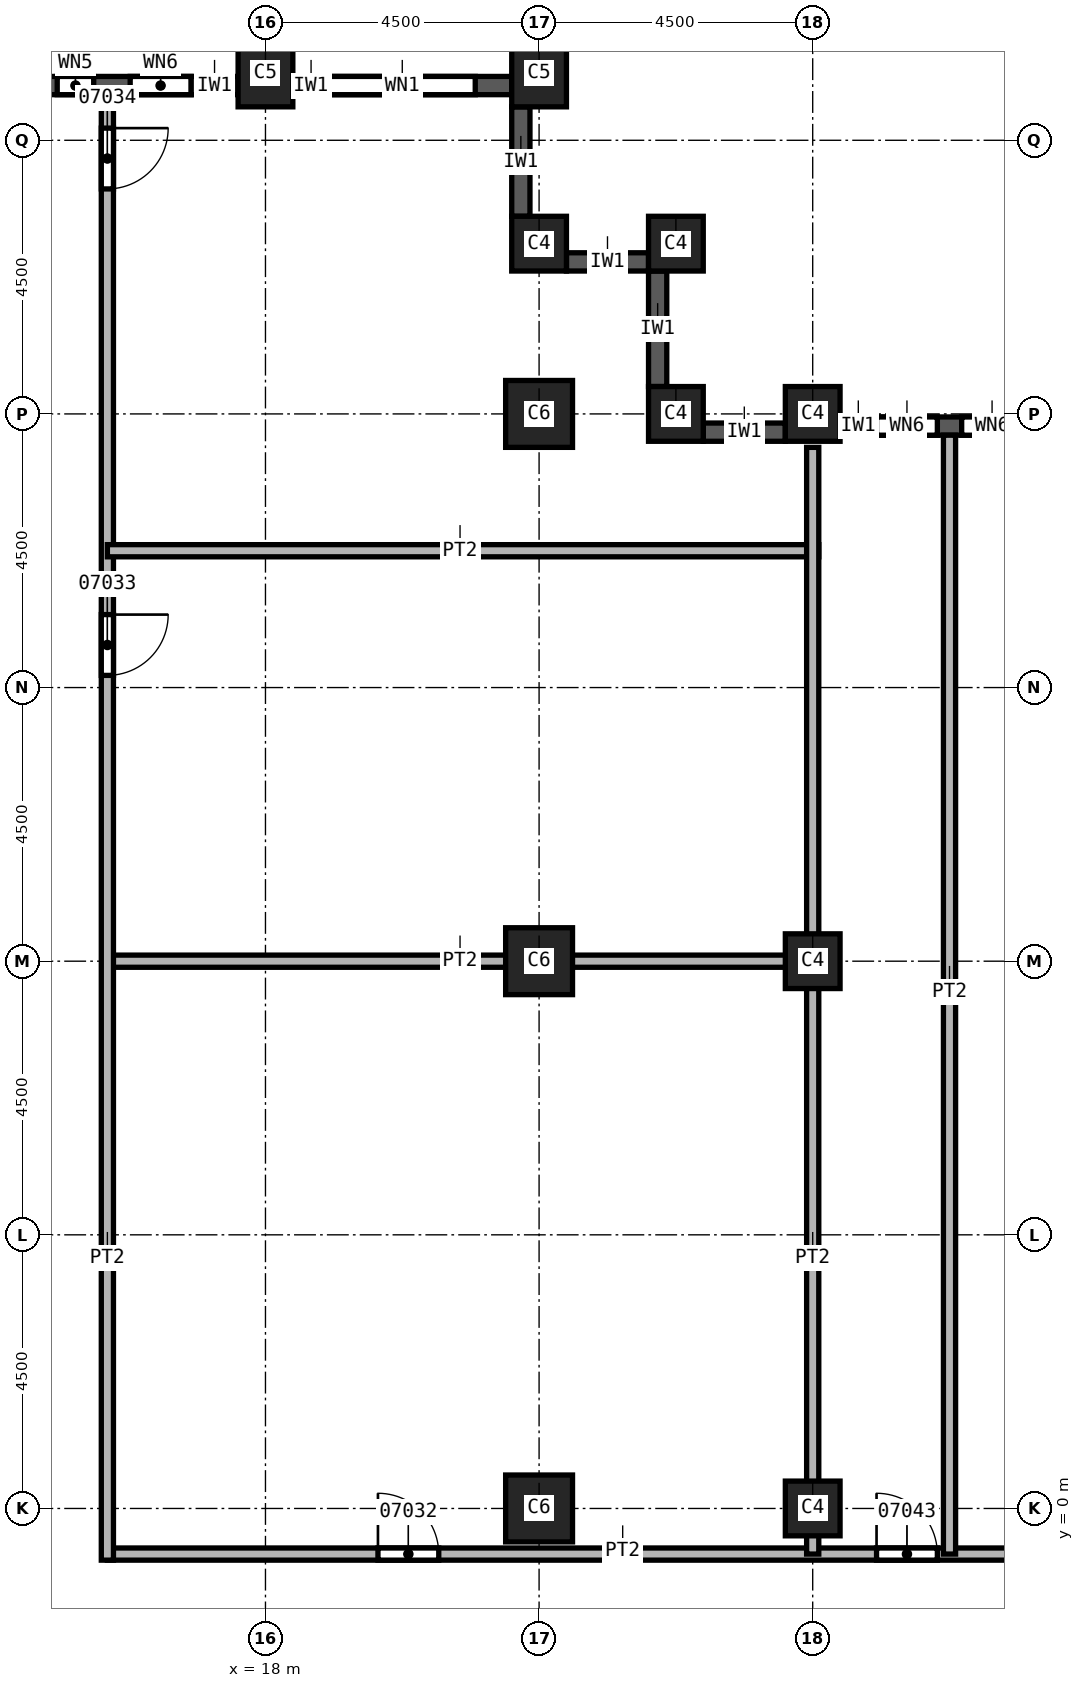
"""IFC4 building model, lengths in metres.
Left out: names, types, materials, properties, quantities, classifications, styles, units other than length and angle.
Written with IfcOpenShell. Run it as: python <this file> out.ifc"""

import sys

from ifc_helpers import new_model, si_unit, direction, frame, frame_2d, origin, origin_2d, place, context, subcontext, project, spatial, rectangle, extrude, element, fill, save


model = new_model("IFC4")
c1 = context("Model", 3, precision=1e-05, world=origin(), true_north=direction((0.0, 1.0)))
c2 = subcontext(c1, "Body", "Model", "MODEL_VIEW")
j1 = project(units=[si_unit("LENGTHUNIT", "METRE"), si_unit("PLANEANGLEUNIT", "RADIAN")], contexts=[c1])
p1 = place(None, origin())
s1 = spatial("IfcSite", under=j1, at=p1, CompositionType="ELEMENT")
p2 = place(p1, origin())
s2 = spatial("IfcBuilding", under=s1, at=p2, CompositionType="ELEMENT")
p3 = place(p2, frame((0.0, 0.0, 138.0)))
s3 = spatial("IfcBuildingStorey", under=s2, at=p3, CompositionType="ELEMENT", Elevation=138.0)
for number, where, z_axis, x_axis in (
    (1, (22.5, 0.0, 0.0), (0.0, 0.0, 1.0), (1.0, 0.0, 0.0)),
    (2, (22.5, 9.0, 0.0), (0.0, 0.0, 1.0), (1.0, 0.0, 0.0)),
    (3, (22.5, 18.0, 0.0), (0.0, 0.0, 1.0), (1.0, 0.0, 0.0)),
):
    element("IfcColumn", number, at=place(p3, frame(where, z_axis=z_axis, x_axis=x_axis)), inside=s3, PredefinedType="COLUMN", context=c2, shape_type="SweptSolid", body=[
        extrude(rectangle(XDim=1.1, YDim=1.1, at=origin_2d()), origin(), (0.0, 0.0, 1.0), 3.7),
    ])
for number, where, z_axis, x_axis in (
    (4, (27.0, 0.0, 0.0), (0.0, 0.0, 1.0), (1.0, 0.0, 0.0)),
    (5, (27.0, 9.0, 0.0), (0.0, 0.0, 1.0), (1.0, 0.0, 0.0)),
    (6, (27.0, 18.0, 0.0), (0.0, 0.0, 1.0), (1.0, 0.0, 0.0)),
):
    element("IfcColumn", number, at=place(p3, frame(where, z_axis=z_axis, x_axis=x_axis)), inside=s3, PredefinedType="COLUMN", context=c2, shape_type="SweptSolid", body=[
        extrude(rectangle(XDim=0.9, YDim=0.9, at=origin_2d()), origin(), (0.0, 0.0, 1.0), 3.7),
    ])
for number, where, z_axis, x_axis in (
    (7, (18.0, 23.6, 0.0), (0.0, 0.0, 1.0), (1.0, 0.0, 0.0)),
    (8, (22.5, 23.6, 0.0), (0.0, 0.0, 1.0), (1.0, 0.0, 0.0)),
):
    element("IfcColumn", number, at=place(p3, frame(where, z_axis=z_axis, x_axis=x_axis)), inside=s3, PredefinedType="COLUMN", context=c2, shape_type="SweptSolid", body=[
        extrude(rectangle(XDim=0.9, YDim=1.1, at=origin_2d()), origin(), (0.0, 0.0, 1.0), 3.7),
    ])
for number, where, z_axis, x_axis in (
    (9, (22.5, 20.8, 0.0), (0.0, 0.0, 1.0), (1.0, 0.0, 0.0)),
    (10, (24.75, 20.8, 0.0), (0.0, 0.0, 1.0), (1.0, 0.0, 0.0)),
    (11, (24.75, 18.0, 0.0), (0.0, 0.0, 1.0), (1.0, 0.0, 0.0)),
):
    element("IfcColumn", number, at=place(p3, frame(where, z_axis=z_axis, x_axis=x_axis)), inside=s3, PredefinedType="COLUMN", context=c2, shape_type="SweptSolid", body=[
        extrude(rectangle(XDim=0.9, YDim=0.9, at=origin_2d()), origin(), (0.0, 0.0, 1.0), 3.7),
    ])
p4 = place(p3, frame((31.05, 17.8, 0.0), z_axis=(0.0, 0.0, 1.0), x_axis=(-1.0, 0.0, 0.0)))
e12 = element("IfcWall", 12, at=p4, inside=s3, PredefinedType="SOLIDWALL", context=c2, shape_type="SweptSolid", body=[
    extrude(rectangle(XDim=3.6, YDim=0.3, at=frame_2d((1.8, 0.0))), origin(), (0.0, 0.0, 1.0), 3.1),
])
p5 = place(p4, frame((0.6, 0.0, 0.8)))
e13 = element("IfcOpeningElement", 13, at=p5, cuts=e12, PredefinedType="OPENING", context=c2, shape_type="SweptSolid", body=[
    extrude(rectangle(XDim=1.0, YDim=1.95, at=frame_2d((0.5, 0.975))), frame((0.0, 0.15, 0.0), z_axis=(0.0, -1.0, 0.0), x_axis=(1.0, 0.0, 0.0)), (0.0, 0.0, 1.0), 0.3),
])
p6 = place(p4, frame((2.0, 0.0, 0.8)))
e14 = element("IfcOpeningElement", 14, at=p6, cuts=e12, PredefinedType="OPENING", context=c2, shape_type="SweptSolid", body=[
    extrude(rectangle(XDim=1.0, YDim=1.95, at=frame_2d((0.5, 0.975))), frame((0.0, 0.15, 0.0), z_axis=(0.0, -1.0, 0.0), x_axis=(1.0, 0.0, 0.0)), (0.0, 0.0, 1.0), 0.3),
])
p7 = place(p3, frame((26.55, 17.7, 0.0), z_axis=(0.0, 0.0, 1.0), x_axis=(-1.0, 0.0, 0.0)))
e15 = element("IfcWall", 15, at=p7, inside=s3, PredefinedType="SOLIDWALL", context=c2, shape_type="SweptSolid", body=[
    extrude(rectangle(XDim=1.35, YDim=0.3, at=frame_2d((0.675, 0.0))), origin(), (0.0, 0.0, 1.0), 3.1),
])
p8 = place(p3, frame((24.45, 18.45, 0.0), z_axis=(0.0, 0.0, 1.0), x_axis=(0.0, 1.0, 0.0)))
e16 = element("IfcWall", 16, at=p8, inside=s3, PredefinedType="SOLIDWALL", context=c2, shape_type="SweptSolid", body=[
    extrude(rectangle(XDim=1.9, YDim=0.3, at=frame_2d((0.95, 0.0))), origin(), (0.0, 0.0, 1.0), 3.1),
])
p9 = place(p3, frame((24.3, 20.5, 0.0), z_axis=(0.0, 0.0, 1.0), x_axis=(-1.0, 0.0, 0.0)))
e17 = element("IfcWall", 17, at=p9, inside=s3, PredefinedType="SOLIDWALL", context=c2, shape_type="SweptSolid", body=[
    extrude(rectangle(XDim=1.35, YDim=0.3, at=frame_2d((0.675, 0.0))), origin(), (0.0, 0.0, 1.0), 3.1),
])
p10 = place(p3, frame((22.2, 21.25, 0.0), z_axis=(0.0, 0.0, 1.0), x_axis=(0.0, 1.0, 0.0)))
e18 = element("IfcWall", 18, at=p10, inside=s3, PredefinedType="SOLIDWALL", context=c2, shape_type="SweptSolid", body=[
    extrude(rectangle(XDim=1.8, YDim=0.3, at=frame_2d((0.9, 0.0))), origin(), (0.0, 0.0, 1.0), 3.1),
])
p11 = place(p3, frame((22.05, 23.4, 0.0), z_axis=(0.0, 0.0, 1.0), x_axis=(-1.0, 0.0, 0.0)))
e19 = element("IfcWall", 19, at=p11, inside=s3, PredefinedType="SOLIDWALL", context=c2, shape_type="SweptSolid", body=[
    extrude(rectangle(XDim=3.6, YDim=0.3, at=frame_2d((1.8, 0.0))), origin(), (0.0, 0.0, 1.0), 3.1),
])
p12 = place(p11, frame((0.6, 0.0, 0.8)))
e20 = element("IfcOpeningElement", 20, at=p12, cuts=e19, PredefinedType="OPENING", context=c2, shape_type="SweptSolid", body=[
    extrude(rectangle(XDim=2.4, YDim=1.95, at=frame_2d((1.2, 0.975))), frame((0.0, 0.15, 0.0), z_axis=(0.0, -1.0, 0.0), x_axis=(1.0, 0.0, 0.0)), (0.0, 0.0, 1.0), 0.3),
])
p13 = place(p3, frame((17.55, 23.4, 0.0), z_axis=(0.0, 0.0, 1.0), x_axis=(-1.0, 0.0, 0.0)))
e21 = element("IfcWall", 21, at=p13, inside=s3, PredefinedType="SOLIDWALL", context=c2, shape_type="SweptSolid", body=[
    extrude(rectangle(XDim=3.6, YDim=0.3, at=frame_2d((1.8, 0.0))), origin(), (0.0, 0.0, 1.0), 3.1),
])
p14 = place(p13, frame((0.775, 0.0, 0.8)))
e22 = element("IfcOpeningElement", 22, at=p14, cuts=e21, PredefinedType="OPENING", context=c2, shape_type="SweptSolid", body=[
    extrude(rectangle(XDim=1.0, YDim=1.95, at=frame_2d((0.5, 0.975))), frame((0.0, 0.15, 0.0), z_axis=(0.0, -1.0, 0.0), x_axis=(1.0, 0.0, 0.0)), (0.0, 0.0, 1.0), 0.3),
])
p15 = place(p13, frame((2.375, 0.0, 0.8)))
e23 = element("IfcOpeningElement", 23, at=p15, cuts=e21, PredefinedType="OPENING", context=c2, shape_type="SweptSolid", body=[
    extrude(rectangle(XDim=0.6, YDim=1.95, at=frame_2d((0.3, 0.975))), frame((0.0, 0.15, 0.0), z_axis=(0.0, -1.0, 0.0), x_axis=(1.0, 0.0, 0.0)), (0.0, 0.0, 1.0), 0.3),
])
p16 = place(p3, frame((15.4, -0.75, 0.0), z_axis=(0.0, 0.0, 1.0), x_axis=(1.0, 0.0, 0.0)))
e24 = element("IfcWall", 24, at=p16, inside=s3, PredefinedType="PARTITIONING", context=c2, shape_type="SweptSolid", body=[
    extrude(rectangle(XDim=18.45, YDim=0.2, at=frame_2d((9.225, 0.0))), origin(), (0.0, 0.0, 1.0), 3.7),
])
p17 = place(p16, frame((4.45, 0.0, 0.0)))
e25 = element("IfcOpeningElement", 25, at=p17, cuts=e24, PredefinedType="OPENING", context=c2, shape_type="SweptSolid", body=[
    extrude(rectangle(XDim=1.0, YDim=2.1, at=frame_2d((0.5, 1.05))), frame((0.0, 0.1, 0.0), z_axis=(0.0, -1.0, 0.0), x_axis=(1.0, 0.0, 0.0)), (0.0, 0.0, 1.0), 0.2),
])
p18 = place(p16, frame((12.65, 0.0, 0.0)))
e26 = element("IfcOpeningElement", 26, at=p18, cuts=e24, PredefinedType="OPENING", context=c2, shape_type="SweptSolid", body=[
    extrude(rectangle(XDim=1.0, YDim=2.1, at=frame_2d((0.5, 1.05))), frame((0.0, 0.1, 0.0), z_axis=(0.0, -1.0, 0.0), x_axis=(1.0, 0.0, 0.0)), (0.0, 0.0, 1.0), 0.2),
])
p19 = place(p3, frame((15.4, 9.0, 0.0), z_axis=(0.0, 0.0, 1.0), x_axis=(1.0, 0.0, 0.0)))
e27 = element("IfcWall", 27, at=p19, inside=s3, PredefinedType="PARTITIONING", context=c2, shape_type="SweptSolid", body=[
    extrude(rectangle(XDim=11.7, YDim=0.2, at=frame_2d((5.85, 0.0))), origin(), (0.0, 0.0, 1.0), 3.7),
])
p20 = place(p3, frame((15.4, 23.25, 0.0), z_axis=(0.0, 0.0, 1.0), x_axis=(0.0, -1.0, 0.0)))
e28 = element("IfcWall", 28, at=p20, inside=s3, PredefinedType="PARTITIONING", context=c2, shape_type="SweptSolid", body=[
    extrude(rectangle(XDim=24.1, YDim=0.2, at=frame_2d((12.05, 0.0))), origin(), (0.0, 0.0, 1.0), 3.7),
])
p21 = place(p20, frame((8.55, 0.0, 0.0)))
e29 = element("IfcOpeningElement", 29, at=p21, cuts=e28, PredefinedType="OPENING", context=c2, shape_type="SweptSolid", body=[
    extrude(rectangle(XDim=1.0, YDim=2.1, at=frame_2d((0.5, 1.05))), frame((0.0, 0.1, 0.0), z_axis=(0.0, -1.0, 0.0), x_axis=(1.0, 0.0, 0.0)), (0.0, 0.0, 1.0), 0.2),
])
p22 = place(p20, frame((0.55, 0.0, 0.0)))
e30 = element("IfcOpeningElement", 30, at=p22, cuts=e28, PredefinedType="OPENING", context=c2, shape_type="SweptSolid", body=[
    extrude(rectangle(XDim=1.0, YDim=2.1, at=frame_2d((0.5, 1.05))), frame((0.0, 0.1, 0.0), z_axis=(0.0, -1.0, 0.0), x_axis=(1.0, 0.0, 0.0)), (0.0, 0.0, 1.0), 0.2),
])
p23 = place(p3, frame((15.4, 15.75, 0.0), z_axis=(0.0, 0.0, 1.0), x_axis=(1.0, 0.0, 0.0)))
e31 = element("IfcWall", 31, at=p23, inside=s3, PredefinedType="PARTITIONING", context=c2, shape_type="SweptSolid", body=[
    extrude(rectangle(XDim=11.7, YDim=0.2, at=frame_2d((5.85, 0.0))), origin(), (0.0, 0.0, 1.0), 3.7),
])
p24 = place(p3, frame((27.0, 17.45, 0.0), z_axis=(0.0, 0.0, 1.0), x_axis=(0.0, -1.0, 0.0)))
e32 = element("IfcWall", 32, at=p24, inside=s3, PredefinedType="PARTITIONING", context=c2, shape_type="SweptSolid", body=[
    extrude(rectangle(XDim=18.2, YDim=0.2, at=frame_2d((9.1, 0.0))), origin(), (0.0, 0.0, 1.0), 3.7),
])
p25 = place(p3, frame((29.25, 17.65, 0.0), z_axis=(0.0, 0.0, 1.0), x_axis=(0.0, -1.0, 0.0)))
e33 = element("IfcWall", 33, at=p25, inside=s3, PredefinedType="PARTITIONING", context=c2, shape_type="SweptSolid", body=[
    extrude(rectangle(XDim=18.4, YDim=0.2, at=frame_2d((9.2, 0.0))), origin(), (0.0, 0.0, 1.0), 3.7),
])
p26 = place(p12, origin())
e34 = element("IfcWindow", 34, at=p26, inside=s3, PartitioningType="SINGLE_PANEL", PredefinedType="WINDOW", context=c2, shape_type="SweptSolid", body=[
    extrude(rectangle(XDim=2.4, YDim=1.95, at=frame_2d((1.2, 0.975))), frame((0.0, 0.03, 0.0), z_axis=(0.0, -1.0, 0.0), x_axis=(1.0, 0.0, 0.0)), (0.0, 0.0, 1.0), 0.06),
])
fill(e20, e34)
p27 = place(p17, origin())
e35 = element("IfcDoor", 35, at=p27, inside=s3, OperationType="SINGLE_SWING_LEFT", PredefinedType="DOOR", context=c2, shape_type="SweptSolid", body=[
    extrude(rectangle(XDim=1.0, YDim=2.1, at=frame_2d((0.5, 1.05))), frame((0.0, 0.025, 0.0), z_axis=(0.0, -1.0, 0.0), x_axis=(1.0, 0.0, 0.0)), (0.0, 0.0, 1.0), 0.05),
])
fill(e25, e35)
p28 = place(p21, origin())
e36 = element("IfcDoor", 36, at=p28, inside=s3, OperationType="SINGLE_SWING_RIGHT", PredefinedType="DOOR", context=c2, shape_type="SweptSolid", body=[
    extrude(rectangle(XDim=1.0, YDim=2.1, at=frame_2d((0.5, 1.05))), frame((0.0, 0.025, 0.0), z_axis=(0.0, -1.0, 0.0), x_axis=(1.0, 0.0, 0.0)), (0.0, 0.0, 1.0), 0.05),
])
fill(e29, e36)
p29 = place(p22, origin())
e37 = element("IfcDoor", 37, at=p29, inside=s3, OperationType="SINGLE_SWING_LEFT", PredefinedType="DOOR", context=c2, shape_type="SweptSolid", body=[
    extrude(rectangle(XDim=1.0, YDim=2.1, at=frame_2d((0.5, 1.05))), frame((0.0, 0.025, 0.0), z_axis=(0.0, -1.0, 0.0), x_axis=(1.0, 0.0, 0.0)), (0.0, 0.0, 1.0), 0.05),
])
fill(e30, e37)
p30 = place(p18, origin())
e38 = element("IfcDoor", 38, at=p30, inside=s3, OperationType="SINGLE_SWING_RIGHT", PredefinedType="DOOR", context=c2, shape_type="SweptSolid", body=[
    extrude(rectangle(XDim=1.0, YDim=2.1, at=frame_2d((0.5, 1.05))), frame((0.0, 0.025, 0.0), z_axis=(0.0, -1.0, 0.0), x_axis=(1.0, 0.0, 0.0)), (0.0, 0.0, 1.0), 0.05),
])
fill(e26, e38)
p31 = place(p5, origin())
e39 = element("IfcWindow", 39, at=p31, inside=s3, PartitioningType="SINGLE_PANEL", PredefinedType="WINDOW", context=c2, shape_type="SweptSolid", body=[
    extrude(rectangle(XDim=1.0, YDim=1.95, at=frame_2d((0.5, 0.975))), frame((0.0, 0.03, 0.0), z_axis=(0.0, -1.0, 0.0), x_axis=(1.0, 0.0, 0.0)), (0.0, 0.0, 1.0), 0.06),
])
fill(e13, e39)
p32 = place(p6, origin())
e40 = element("IfcWindow", 40, at=p32, inside=s3, PartitioningType="SINGLE_PANEL", PredefinedType="WINDOW", context=c2, shape_type="SweptSolid", body=[
    extrude(rectangle(XDim=1.0, YDim=1.95, at=frame_2d((0.5, 0.975))), frame((0.0, 0.03, 0.0), z_axis=(0.0, -1.0, 0.0), x_axis=(1.0, 0.0, 0.0)), (0.0, 0.0, 1.0), 0.06),
])
fill(e14, e40)
p33 = place(p14, origin())
e41 = element("IfcWindow", 41, at=p33, inside=s3, PartitioningType="SINGLE_PANEL", PredefinedType="WINDOW", context=c2, shape_type="SweptSolid", body=[
    extrude(rectangle(XDim=1.0, YDim=1.95, at=frame_2d((0.5, 0.975))), frame((0.0, 0.03, 0.0), z_axis=(0.0, -1.0, 0.0), x_axis=(1.0, 0.0, 0.0)), (0.0, 0.0, 1.0), 0.06),
])
fill(e22, e41)
p34 = place(p15, origin())
e42 = element("IfcWindow", 42, at=p34, inside=s3, PartitioningType="SINGLE_PANEL", PredefinedType="WINDOW", context=c2, shape_type="SweptSolid", body=[
    extrude(rectangle(XDim=0.6, YDim=1.95, at=frame_2d((0.3, 0.975))), frame((0.0, 0.03, 0.0), z_axis=(0.0, -1.0, 0.0), x_axis=(1.0, 0.0, 0.0)), (0.0, 0.0, 1.0), 0.06),
])
fill(e23, e42)
save(model, sys.argv[1])
